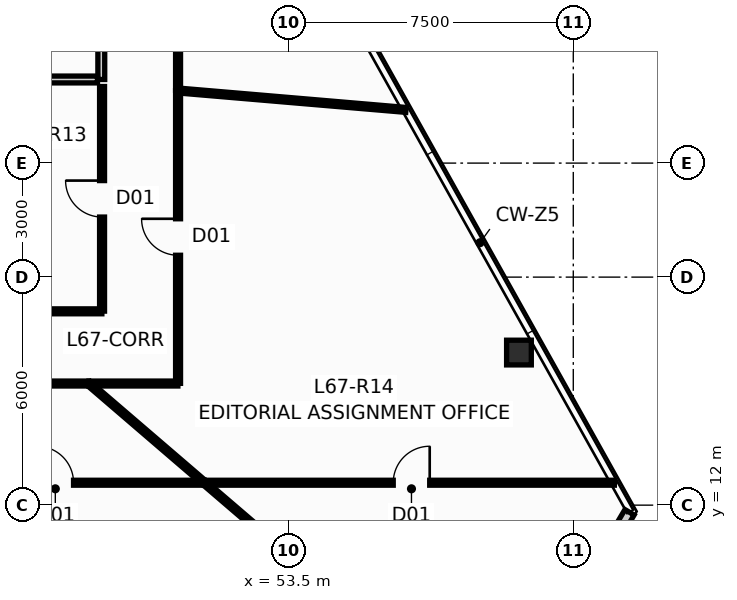
"""IFC4 building model, lengths in metres.
Left out: names, types, materials, properties, quantities, classifications, styles, units other than length and angle.
Written with IfcOpenShell. Run it as: python <this file> out.ifc"""

import sys

from ifc_helpers import new_model, si_unit, direction, frame, frame_2d, origin, origin_2d, place, context, subcontext, project, spatial, rectangle, hollow_rectangle, extrude, source, transform, mapped, element, fill, save


model = new_model("IFC4")
c1 = context("Model", 3, precision=1e-05, world=origin(), true_north=direction((0.0, 1.0)))
c2 = subcontext(c1, "Body", "Model", "MODEL_VIEW")
j1 = project(units=[si_unit("LENGTHUNIT", "METRE"), si_unit("PLANEANGLEUNIT", "RADIAN")], contexts=[c1])
p1 = place(None, origin())
s1 = spatial("IfcSite", under=j1, at=p1, CompositionType="ELEMENT")
p2 = place(p1, origin())
s2 = spatial("IfcBuilding", under=s1, at=p2, CompositionType="ELEMENT")
p3 = place(p2, frame((0.0, 0.0, 255.4)))
s3 = spatial("IfcBuildingStorey", under=s2, at=p3, CompositionType="ELEMENT", Elevation=255.4)
m1 = source(origin(), c2, "Body", "SweptSolid", [
    extrude(hollow_rectangle(XDim=0.65, YDim=0.65, WallThickness=0.04, at=origin_2d()), origin(), (0.0, 0.0, 1.0), 3.651),
])
p4 = place(p3, frame((59.57, 16.015, 0.0), z_axis=(-0.010431098089, -0.021530856313, 0.999713766245), x_axis=(0.899947055326, -0.435999194506, 0.0)))
e1 = element("IfcColumn", 1, at=p4, inside=s3, PredefinedType="COLUMN", context=c2, shape_type="MappedRepresentation", body=[
    mapped(m1, transform((0.0, 0.0, 0.0), scale=1.0)),
])
p5 = place(p3, frame((62.48, 11.812, 0.0), z_axis=(0.0, 0.0, 1.0), x_axis=(-0.508278667551, -0.861192659114, 0.0)))
e2 = element("IfcWall", 2, at=p5, inside=s3, PredefinedType="STANDARD", context=c2, shape_type="SweptSolid", body=[
    extrude(rectangle(XDim=3.432, YDim=0.28, at=frame_2d((1.716, 0.0))), origin(), (0.0, 0.0, 1.0), 3.4),
])
p6 = place(p5, frame((1.12, 0.0, 0.9)))
e3 = element("IfcOpeningElement", 3, at=p6, cuts=e2, PredefinedType="OPENING", context=c2, shape_type="SweptSolid", body=[
    extrude(rectangle(XDim=1.2, YDim=1.65, at=frame_2d((0.6, 0.825))), frame((0.0, 0.152, 0.0), z_axis=(0.0, -1.0, 0.0), x_axis=(1.0, 0.0, 0.0)), (0.0, 0.0, 1.0), 0.304),
])
p7 = place(p3, frame((48.58, 23.2, 0.0), z_axis=(0.0, 0.0, 1.0), x_axis=(0.0, 1.0, 0.0)))
e4 = element("IfcWall", 4, at=p7, inside=s3, PredefinedType="PARTITIONING", context=c2, shape_type="SweptSolid", body=[
    extrude(rectangle(XDim=6.4, YDim=0.18, at=frame_2d((3.2, 0.0))), origin(), (0.0, 0.0, 1.0), 3.085),
])
p8 = place(p7, frame((2.65, 0.0, 0.0)))
e5 = element("IfcOpeningElement", 5, at=p8, cuts=e4, PredefinedType="OPENING", context=c2, shape_type="SweptSolid", body=[
    extrude(rectangle(XDim=1.05, YDim=2.15, at=frame_2d((0.525, 1.075))), frame((0.0, 0.102, 0.0), z_axis=(0.0, -1.0, 0.0), x_axis=(1.0, 0.0, 0.0)), (0.0, 0.0, 1.0), 0.204),
])
p9 = place(p3, frame((45.72, 23.2, 0.0), z_axis=(0.0, 0.0, 1.0), x_axis=(1.0, 0.0, 0.0)))
e6 = element("IfcWall", 6, at=p9, inside=s3, PredefinedType="PARTITIONING", context=c2, shape_type="SweptSolid", body=[
    extrude(rectangle(XDim=2.76, YDim=0.18, at=frame_2d((1.38, 0.0))), origin(), (0.0, 0.0, 1.0), 3.4),
])
p10 = place(p3, frame((51.295, 12.59, 0.0), z_axis=(0.0, 0.0, 1.0), x_axis=(1.0, 0.0, 0.0)))
e7 = element("IfcWall", 7, at=p10, inside=s3, PredefinedType="PARTITIONING", context=c2, shape_type="SweptSolid", body=[
    extrude(rectangle(XDim=10.785, YDim=0.13, at=frame_2d((5.393, 0.0))), origin(), (0.0, 0.0, 1.0), 3.085),
])
p11 = place(p10, frame((4.967, 0.0, 0.0)))
e8 = element("IfcOpeningElement", 8, at=p11, cuts=e7, PredefinedType="OPENING", context=c2, shape_type="SweptSolid", body=[
    extrude(rectangle(XDim=0.96, YDim=2.15, at=frame_2d((0.48, 1.075))), frame((0.0, 0.077, 0.0), z_axis=(0.0, -1.0, 0.0), x_axis=(1.0, 0.0, 0.0)), (0.0, 0.0, 1.0), 0.154),
])
p12 = place(p3, frame((50.6, 22.915, 0.0), z_axis=(0.0, 0.0, 1.0), x_axis=(0.0, 1.0, 0.0)))
e9 = element("IfcWall", 9, at=p12, inside=s3, PredefinedType="PARTITIONING", context=c2, shape_type="SweptSolid", body=[
    extrude(rectangle(XDim=10.182, YDim=0.13, at=frame_2d((5.091, 0.0))), origin(), (0.0, 0.0, 1.0), 3.085),
])
p13 = place(p12, frame((4.135, 0.0, 0.0)))
e10 = element("IfcOpeningElement", 10, at=p13, cuts=e9, PredefinedType="OPENING", context=c2, shape_type="SweptSolid", body=[
    extrude(rectangle(XDim=0.96, YDim=2.15, at=frame_2d((0.48, 1.075))), frame((0.0, 0.077, 0.0), z_axis=(0.0, -1.0, 0.0), x_axis=(1.0, 0.0, 0.0)), (0.0, 0.0, 1.0), 0.154),
])
p14 = place(p3, frame((43.455, 12.59, 0.0), z_axis=(0.0, 0.0, 1.0), x_axis=(1.0, 0.0, 0.0)))
e11 = element("IfcWall", 11, at=p14, inside=s3, PredefinedType="PARTITIONING", context=c2, shape_type="SweptSolid", body=[
    extrude(rectangle(XDim=7.83, YDim=0.13, at=frame_2d((3.915, 0.0))), origin(), (0.0, 0.0, 1.0), 3.085),
])
p15 = place(p14, frame((3.435, 0.0, 0.0)))
e12 = element("IfcOpeningElement", 12, at=p15, cuts=e11, PredefinedType="OPENING", context=c2, shape_type="SweptSolid", body=[
    extrude(rectangle(XDim=0.96, YDim=2.15, at=frame_2d((0.48, 1.075))), frame((0.0, 0.077, 0.0), z_axis=(0.0, -1.0, 0.0), x_axis=(1.0, 0.0, 0.0)), (0.0, 0.0, 1.0), 0.154),
])
p16 = place(p3, frame((50.6, 15.205, 0.0), z_axis=(0.0, 0.0, 1.0), x_axis=(0.0, 1.0, 0.0)))
e13 = element("IfcWall", 13, at=p16, inside=s3, PredefinedType="PARTITIONING", context=c2, shape_type="SweptSolid", body=[
    extrude(rectangle(XDim=7.7, YDim=0.13, at=frame_2d((3.85, 0.0))), origin(), (0.0, 0.0, 1.0), 3.085),
])
p17 = place(p16, frame((3.37, 0.0, 0.0)))
e14 = element("IfcOpeningElement", 14, at=p17, cuts=e13, PredefinedType="OPENING", context=c2, shape_type="SweptSolid", body=[
    extrude(rectangle(XDim=0.96, YDim=2.15, at=frame_2d((0.48, 1.075))), frame((0.0, 0.077, 0.0), z_axis=(0.0, -1.0, 0.0), x_axis=(1.0, 0.0, 0.0)), (0.0, 0.0, 1.0), 0.154),
])
p18 = place(p3, frame((50.605, 22.91, 0.0), z_axis=(0.0, 0.0, 1.0), x_axis=(0.996393480537, -0.084853001969, 0.0)))
e15 = element("IfcWall", 15, at=p18, inside=s3, PredefinedType="PARTITIONING", context=c2, shape_type="SweptSolid", body=[
    extrude(rectangle(XDim=6.013, YDim=0.13, at=frame_2d((3.007, 0.0))), origin(), (0.0, 0.0, 1.0), 3.4),
])
p19 = place(p3, frame((51.294, 12.587, 0.0), z_axis=(0.0, 0.0, 1.0), x_axis=(0.759126371021, -0.650943279265, 0.0)))
e16 = element("IfcWall", 16, at=p19, inside=s3, PredefinedType="PARTITIONING", context=c2, shape_type="SweptSolid", body=[
    extrude(rectangle(XDim=5.956, YDim=0.13, at=frame_2d((2.978, 0.0))), origin(), (0.0, 0.0, 1.0), 2.985),
])
p20 = place(p3, frame((42.205, 15.2, 0.0), z_axis=(0.0, 0.0, 1.0), x_axis=(1.0, 0.0, 0.0)))
e17 = element("IfcWall", 17, at=p20, inside=s3, PredefinedType="PARTITIONING", context=c2, shape_type="SweptSolid", body=[
    extrude(rectangle(XDim=6.04, YDim=0.13, at=frame_2d((3.02, 0.0))), origin(), (0.0, 0.0, 1.0), 3.085),
])
p21 = place(p20, frame((2.54, 0.0, 0.0)))
e18 = element("IfcOpeningElement", 18, at=p21, cuts=e17, PredefinedType="OPENING", context=c2, shape_type="SweptSolid", body=[
    extrude(rectangle(XDim=0.96, YDim=2.15, at=frame_2d((0.48, 1.075))), frame((0.0, 0.077, 0.0), z_axis=(0.0, -1.0, 0.0), x_axis=(1.0, 0.0, 0.0)), (0.0, 0.0, 1.0), 0.154),
])
p22 = place(p3, frame((48.6, 17.105, 0.0), z_axis=(0.0, 0.0, 1.0), x_axis=(0.0, 1.0, 0.0)))
e19 = element("IfcWall", 19, at=p22, inside=s3, PredefinedType="PARTITIONING", context=c2, shape_type="SweptSolid", body=[
    extrude(rectangle(XDim=5.91, YDim=0.13, at=frame_2d((2.955, 0.0))), origin(), (0.0, 0.0, 1.0), 3.085),
])
p23 = place(p22, frame((2.475, 0.0, 0.0)))
e20 = element("IfcOpeningElement", 20, at=p23, cuts=e19, PredefinedType="OPENING", context=c2, shape_type="SweptSolid", body=[
    extrude(rectangle(XDim=0.96, YDim=2.15, at=frame_2d((0.48, 1.075))), frame((0.0, 0.077, 0.0), z_axis=(0.0, -1.0, 0.0), x_axis=(1.0, 0.0, 0.0)), (0.0, 0.0, 1.0), 0.154),
])
p24 = place(p3, frame((48.254, 15.197, 0.0), z_axis=(0.0, 0.0, 1.0), x_axis=(0.758618075829, -0.651535582317, 0.0)))
e21 = element("IfcWall", 21, at=p24, inside=s3, PredefinedType="PARTITIONING", context=c2, shape_type="SweptSolid", body=[
    extrude(rectangle(XDim=3.997, YDim=0.13, at=frame_2d((1.999, 0.0))), origin(), (0.0, 0.0, 1.0), 2.985),
])
p25 = place(p3, frame((46.045, 17.1, 0.0), z_axis=(0.0, 0.0, 1.0), x_axis=(1.0, 0.0, 0.0)))
e22 = element("IfcWall", 22, at=p25, inside=s3, PredefinedType="PARTITIONING", context=c2, shape_type="SweptSolid", body=[
    extrude(rectangle(XDim=2.55, YDim=0.13, at=frame_2d((1.275, 0.0))), origin(), (0.0, 0.0, 1.0), 2.985),
])
p26 = place(p3, frame((48.255, 15.2, 0.0), z_axis=(0.0, 0.0, 1.0), x_axis=(1.0, 0.0, 0.0)))
e23 = element("IfcWall", 23, at=p26, inside=s3, PredefinedType="PARTITIONING", context=c2, shape_type="SweptSolid", body=[
    extrude(rectangle(XDim=2.34, YDim=0.13, at=frame_2d((1.17, 0.0))), origin(), (0.0, 0.0, 1.0), 3.085),
])
p27 = place(p11, origin())
e24 = element("IfcDoor", 24, at=p27, inside=s3, OperationType="SINGLE_SWING_RIGHT", PredefinedType="DOOR", context=c2, shape_type="SweptSolid", body=[
    extrude(rectangle(XDim=0.96, YDim=2.15, at=frame_2d((0.48, 1.075))), frame((0.0, 0.025, 0.0), z_axis=(0.0, -1.0, 0.0), x_axis=(1.0, 0.0, 0.0)), (0.0, 0.0, 1.0), 0.05),
])
fill(e8, e24)
p28 = place(p15, origin())
e25 = element("IfcDoor", 25, at=p28, inside=s3, OperationType="SINGLE_SWING_LEFT", PredefinedType="DOOR", context=c2, shape_type="SweptSolid", body=[
    extrude(rectangle(XDim=0.96, YDim=2.15, at=frame_2d((0.48, 1.075))), frame((0.0, 0.025, 0.0), z_axis=(0.0, -1.0, 0.0), x_axis=(1.0, 0.0, 0.0)), (0.0, 0.0, 1.0), 0.05),
])
fill(e12, e25)
p29 = place(p17, origin())
e26 = element("IfcDoor", 26, at=p29, inside=s3, OperationType="SINGLE_SWING_RIGHT", PredefinedType="DOOR", context=c2, shape_type="SweptSolid", body=[
    extrude(rectangle(XDim=0.96, YDim=2.15, at=frame_2d((0.48, 1.075))), frame((0.0, 0.025, 0.0), z_axis=(0.0, -1.0, 0.0), x_axis=(1.0, 0.0, 0.0)), (0.0, 0.0, 1.0), 0.05),
])
fill(e14, e26)
p30 = place(p23, origin())
e27 = element("IfcDoor", 27, at=p30, inside=s3, OperationType="SINGLE_SWING_RIGHT", PredefinedType="DOOR", context=c2, shape_type="SweptSolid", body=[
    extrude(rectangle(XDim=0.96, YDim=2.15, at=frame_2d((0.48, 1.075))), frame((0.0, 0.025, 0.0), z_axis=(0.0, -1.0, 0.0), x_axis=(1.0, 0.0, 0.0)), (0.0, 0.0, 1.0), 0.05),
])
fill(e20, e27)
save(model, sys.argv[1])
